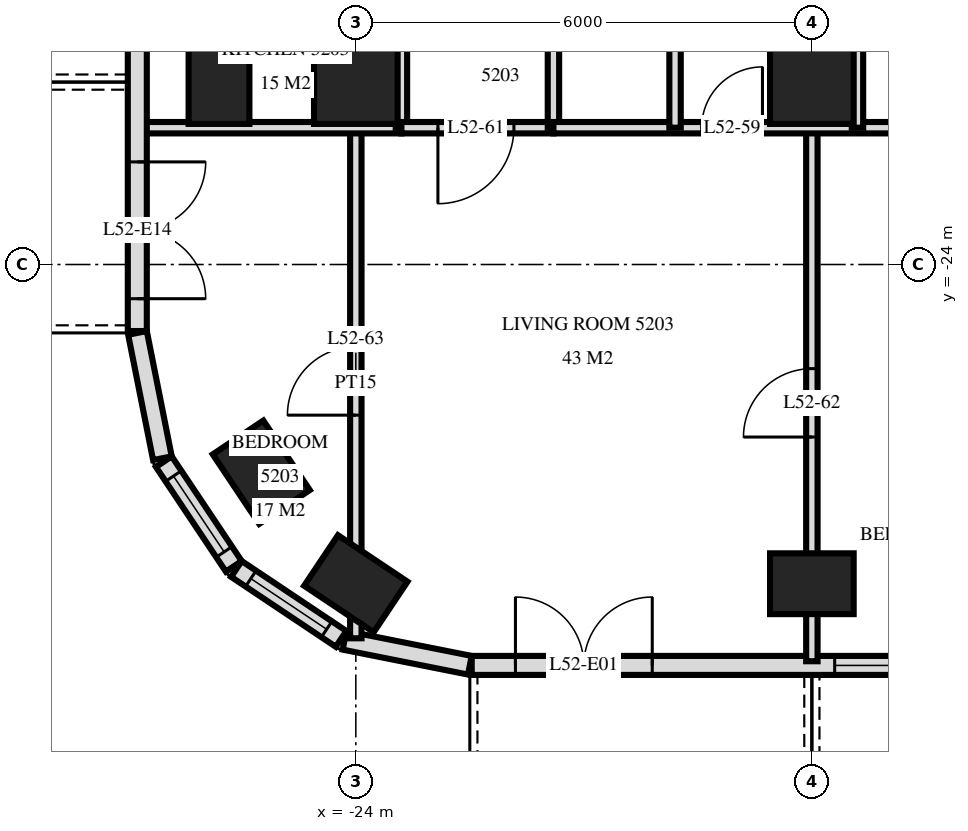
"""IFC4 building model, lengths in metres.
Left out: names, types, materials, properties, quantities, classifications, styles, units other than length and angle.
Written with IfcOpenShell. Run it as: python <this file> out.ifc"""

import sys

from ifc_helpers import new_model, si_unit, direction, frame, frame_2d, origin, origin_2d, place, context, subcontext, project, spatial, rectangle, extrude, element, fill, save


model = new_model("IFC4")
c1 = context("Model", 3, precision=1e-05, world=origin(), true_north=direction((0.0, 1.0)))
c2 = subcontext(c1, "Body", "Model", "MODEL_VIEW")
j1 = project(units=[si_unit("LENGTHUNIT", "METRE"), si_unit("PLANEANGLEUNIT", "RADIAN")], contexts=[c1])
p1 = place(None, origin())
s1 = spatial("IfcSite", under=j1, at=p1, CompositionType="ELEMENT")
p2 = place(p1, origin())
s2 = spatial("IfcBuilding", under=s1, at=p2, CompositionType="ELEMENT")
p3 = place(p2, frame((0.0, 0.0, 201.1)))
s3 = spatial("IfcBuildingStorey", under=s2, at=p3, CompositionType="ELEMENT", Elevation=201.1)
for number, where, z_axis, x_axis in (
    (1, (-25.8, -21.6, 0.0), (0.0, 0.0, 1.0), (0.0, 1.0, 0.0)),
    (2, (-25.244, -26.733, 0.0), (0.0, 0.0, 1.0), (-0.556, 0.831, 0.0)),
    (3, (-24.0, -28.2, 0.0), (0.0, 0.0, 1.0), (-0.831, 0.556, 0.0)),
):
    element("IfcColumn", number, at=place(p3, frame(where, z_axis=z_axis, x_axis=x_axis)), inside=s3, PredefinedType="COLUMN", context=c2, shape_type="SweptSolid", body=[
        extrude(rectangle(XDim=1.1, YDim=0.8, at=origin_2d()), origin(), (0.0, 0.0, 1.0), 3.5),
    ])
p4 = place(p3, frame((-24.0, -21.6, 0.0), z_axis=(0.0, 0.0, 1.0), x_axis=(1.0, 0.0, 0.0)))
e4 = element("IfcColumn", 4, at=p4, inside=s3, PredefinedType="COLUMN", context=c2, shape_type="SweptSolid", body=[
    extrude(rectangle(XDim=1.1, YDim=1.1, at=origin_2d()), origin(), (0.0, 0.0, 1.0), 3.5),
])
p5 = place(p3, frame((-18.0, -28.2, 0.0), z_axis=(0.0, 0.0, 1.0), x_axis=(1.0, 0.0, 0.0)))
e5 = element("IfcColumn", 5, at=p5, inside=s3, PredefinedType="COLUMN", context=c2, shape_type="SweptSolid", body=[
    extrude(rectangle(XDim=1.1, YDim=0.8, at=origin_2d()), origin(), (0.0, 0.0, 1.0), 3.5),
])
p6 = place(p3, frame((-18.0, -21.6, 0.0), z_axis=(0.0, 0.0, 1.0), x_axis=(1.0, 0.0, 0.0)))
e6 = element("IfcColumn", 6, at=p6, inside=s3, PredefinedType="COLUMN", context=c2, shape_type="SweptSolid", body=[
    extrude(rectangle(XDim=1.1, YDim=1.1, at=origin_2d()), origin(), (0.0, 0.0, 1.0), 3.5),
])
p7 = place(p3, frame((-26.875, -3.325, 0.0), z_axis=(0.0, 0.0, 1.0), x_axis=(0.0, -1.0, 0.0)))
e7 = element("IfcWall", 7, at=p7, inside=s3, PredefinedType="SOLIDWALL", context=c2, shape_type="SweptSolid", body=[
    extrude(rectangle(XDim=21.551, YDim=0.25, at=frame_2d((10.775, 0.0))), origin(), (0.0, 0.0, 1.0), 3.22),
])
p8 = place(p7, frame((7.775, 0.0, 0.0)))
e8 = element("IfcOpeningElement", 8, at=p8, cuts=e7, PredefinedType="OPENING", context=c2, shape_type="SweptSolid", body=[
    extrude(rectangle(XDim=1.8, YDim=2.4, at=frame_2d((0.9, 1.2))), frame((0.0, 0.135, 0.0), z_axis=(0.0, -1.0, 0.0), x_axis=(1.0, 0.0, 0.0)), (0.0, 0.0, 1.0), 0.27),
])
p9 = place(p7, frame((12.575, 0.0, 0.9)))
e9 = element("IfcOpeningElement", 9, at=p9, cuts=e7, PredefinedType="OPENING", context=c2, shape_type="SweptSolid", body=[
    extrude(rectangle(XDim=1.2, YDim=1.5, at=frame_2d((0.6, 0.75))), frame((0.0, 0.135, 0.0), z_axis=(0.0, -1.0, 0.0), x_axis=(1.0, 0.0, 0.0)), (0.0, 0.0, 1.0), 0.27),
])
p10 = place(p7, frame((15.275, 0.0, 0.0)))
e10 = element("IfcOpeningElement", 10, at=p10, cuts=e7, PredefinedType="OPENING", context=c2, shape_type="SweptSolid", body=[
    extrude(rectangle(XDim=1.8, YDim=2.4, at=frame_2d((0.9, 1.2))), frame((0.0, 0.135, 0.0), z_axis=(0.0, -1.0, 0.0), x_axis=(1.0, 0.0, 0.0)), (0.0, 0.0, 1.0), 0.27),
])
p11 = place(p7, frame((19.325, 0.0, 0.0)))
e11 = element("IfcOpeningElement", 11, at=p11, cuts=e7, PredefinedType="OPENING", context=c2, shape_type="SweptSolid", body=[
    extrude(rectangle(XDim=1.8, YDim=2.4, at=frame_2d((0.9, 1.2))), frame((0.0, 0.135, 0.0), z_axis=(0.0, -1.0, 0.0), x_axis=(1.0, 0.0, 0.0)), (0.0, 0.0, 1.0), 0.27),
])
p12 = place(p3, frame((-26.873, -24.9, 0.0), z_axis=(0.0, 0.0, 1.0), x_axis=(0.195026884138, -0.980797896849, 0.0)))
e12 = element("IfcWall", 12, at=p12, inside=s3, PredefinedType="SOLIDWALL", context=c2, shape_type="SweptSolid", body=[
    extrude(rectangle(XDim=1.681, YDim=0.25, at=frame_2d((0.841, 0.0))), origin(), (0.0, 0.0, 1.0), 3.22),
])
p13 = place(p3, frame((-26.526, -26.594, 0.0), z_axis=(0.0, 0.0, 1.0), x_axis=(0.55555029066, -0.831482937015, 0.0)))
e13 = element("IfcWall", 13, at=p13, inside=s3, PredefinedType="SOLIDWALL", context=c2, shape_type="SweptSolid", body=[
    extrude(rectangle(XDim=1.656, YDim=0.25, at=frame_2d((0.828, 0.0))), origin(), (0.0, 0.0, 1.0), 3.22),
])
p14 = place(p13, frame((0.228, 0.0, 0.9)))
e14 = element("IfcOpeningElement", 14, at=p14, cuts=e13, PredefinedType="OPENING", context=c2, shape_type="SweptSolid", body=[
    extrude(rectangle(XDim=1.2, YDim=1.5, at=frame_2d((0.6, 0.75))), frame((0.0, 0.135, 0.0), z_axis=(0.0, -1.0, 0.0), x_axis=(1.0, 0.0, 0.0)), (0.0, 0.0, 1.0), 0.27),
])
p15 = place(p3, frame((-25.571, -28.006, 0.0), z_axis=(0.0, 0.0, 1.0), x_axis=(0.831482937015, -0.55555029066, 0.0)))
e15 = element("IfcWall", 15, at=p15, inside=s3, PredefinedType="SOLIDWALL", context=c2, shape_type="SweptSolid", body=[
    extrude(rectangle(XDim=1.656, YDim=0.25, at=frame_2d((0.828, 0.0))), origin(), (0.0, 0.0, 1.0), 3.22),
])
p16 = place(p15, frame((0.228, 0.0, 0.9)))
e16 = element("IfcOpeningElement", 16, at=p16, cuts=e15, PredefinedType="OPENING", context=c2, shape_type="SweptSolid", body=[
    extrude(rectangle(XDim=1.2, YDim=1.5, at=frame_2d((0.6, 0.75))), frame((0.0, 0.135, 0.0), z_axis=(0.0, -1.0, 0.0), x_axis=(1.0, 0.0, 0.0)), (0.0, 0.0, 1.0), 0.27),
])
p17 = place(p3, frame((-24.149, -28.945, 0.0), z_axis=(0.0, 0.0, 1.0), x_axis=(0.980775640221, -0.19513878023, 0.0)))
e17 = element("IfcWall", 17, at=p17, inside=s3, PredefinedType="SOLIDWALL", context=c2, shape_type="SweptSolid", body=[
    extrude(rectangle(XDim=1.681, YDim=0.25, at=frame_2d((0.841, 0.0))), origin(), (0.0, 0.0, 1.0), 3.22),
])
p18 = place(p3, frame((-22.475, -29.275, 0.0), z_axis=(0.0, 0.0, 1.0), x_axis=(1.0, 0.0, 0.0)))
e18 = element("IfcWall", 18, at=p18, inside=s3, PredefinedType="SOLIDWALL", context=c2, shape_type="SweptSolid", body=[
    extrude(rectangle(XDim=44.951, YDim=0.25, at=frame_2d((22.475, 0.0))), origin(), (0.0, 0.0, 1.0), 3.22),
])
p19 = place(p18, frame((0.575, 0.0, 0.0)))
e19 = element("IfcOpeningElement", 19, at=p19, cuts=e18, PredefinedType="OPENING", context=c2, shape_type="SweptSolid", body=[
    extrude(rectangle(XDim=1.8, YDim=2.4, at=frame_2d((0.9, 1.2))), frame((0.0, 0.135, 0.0), z_axis=(0.0, -1.0, 0.0), x_axis=(1.0, 0.0, 0.0)), (0.0, 0.0, 1.0), 0.27),
])
p20 = place(p18, frame((4.775, 0.0, 0.9)))
e20 = element("IfcOpeningElement", 20, at=p20, cuts=e18, PredefinedType="OPENING", context=c2, shape_type="SweptSolid", body=[
    extrude(rectangle(XDim=2.4, YDim=1.5, at=frame_2d((1.2, 0.75))), frame((0.0, 0.135, 0.0), z_axis=(0.0, -1.0, 0.0), x_axis=(1.0, 0.0, 0.0)), (0.0, 0.0, 1.0), 0.27),
])
p21 = place(p18, frame((8.075, 0.0, 0.0)))
e21 = element("IfcOpeningElement", 21, at=p21, cuts=e18, PredefinedType="OPENING", context=c2, shape_type="SweptSolid", body=[
    extrude(rectangle(XDim=1.8, YDim=2.4, at=frame_2d((0.9, 1.2))), frame((0.0, 0.135, 0.0), z_axis=(0.0, -1.0, 0.0), x_axis=(1.0, 0.0, 0.0)), (0.0, 0.0, 1.0), 0.27),
])
p22 = place(p18, frame((11.075, 0.0, 0.0)))
e22 = element("IfcOpeningElement", 22, at=p22, cuts=e18, PredefinedType="OPENING", context=c2, shape_type="SweptSolid", body=[
    extrude(rectangle(XDim=1.8, YDim=2.4, at=frame_2d((0.9, 1.2))), frame((0.0, 0.135, 0.0), z_axis=(0.0, -1.0, 0.0), x_axis=(1.0, 0.0, 0.0)), (0.0, 0.0, 1.0), 0.27),
])
p23 = place(p18, frame((13.775, 0.0, 0.9)))
e23 = element("IfcOpeningElement", 23, at=p23, cuts=e18, PredefinedType="OPENING", context=c2, shape_type="SweptSolid", body=[
    extrude(rectangle(XDim=2.4, YDim=1.5, at=frame_2d((1.2, 0.75))), frame((0.0, 0.135, 0.0), z_axis=(0.0, -1.0, 0.0), x_axis=(1.0, 0.0, 0.0)), (0.0, 0.0, 1.0), 0.27),
])
p24 = place(p18, frame((16.775, 0.0, 0.9)))
e24 = element("IfcOpeningElement", 24, at=p24, cuts=e18, PredefinedType="OPENING", context=c2, shape_type="SweptSolid", body=[
    extrude(rectangle(XDim=2.4, YDim=1.5, at=frame_2d((1.2, 0.75))), frame((0.0, 0.135, 0.0), z_axis=(0.0, -1.0, 0.0), x_axis=(1.0, 0.0, 0.0)), (0.0, 0.0, 1.0), 0.27),
])
p25 = place(p18, frame((20.075, 0.0, 0.0)))
e25 = element("IfcOpeningElement", 25, at=p25, cuts=e18, PredefinedType="OPENING", context=c2, shape_type="SweptSolid", body=[
    extrude(rectangle(XDim=1.8, YDim=2.4, at=frame_2d((0.9, 1.2))), frame((0.0, 0.135, 0.0), z_axis=(0.0, -1.0, 0.0), x_axis=(1.0, 0.0, 0.0)), (0.0, 0.0, 1.0), 0.27),
])
p26 = place(p18, frame((23.075, 0.0, 0.0)))
e26 = element("IfcOpeningElement", 26, at=p26, cuts=e18, PredefinedType="OPENING", context=c2, shape_type="SweptSolid", body=[
    extrude(rectangle(XDim=1.8, YDim=2.4, at=frame_2d((0.9, 1.2))), frame((0.0, 0.135, 0.0), z_axis=(0.0, -1.0, 0.0), x_axis=(1.0, 0.0, 0.0)), (0.0, 0.0, 1.0), 0.27),
])
p27 = place(p18, frame((25.775, 0.0, 0.9)))
e27 = element("IfcOpeningElement", 27, at=p27, cuts=e18, PredefinedType="OPENING", context=c2, shape_type="SweptSolid", body=[
    extrude(rectangle(XDim=2.4, YDim=1.5, at=frame_2d((1.2, 0.75))), frame((0.0, 0.135, 0.0), z_axis=(0.0, -1.0, 0.0), x_axis=(1.0, 0.0, 0.0)), (0.0, 0.0, 1.0), 0.27),
])
p28 = place(p18, frame((29.075, 0.0, 0.0)))
e28 = element("IfcOpeningElement", 28, at=p28, cuts=e18, PredefinedType="OPENING", context=c2, shape_type="SweptSolid", body=[
    extrude(rectangle(XDim=1.8, YDim=2.4, at=frame_2d((0.9, 1.2))), frame((0.0, 0.135, 0.0), z_axis=(0.0, -1.0, 0.0), x_axis=(1.0, 0.0, 0.0)), (0.0, 0.0, 1.0), 0.27),
])
p29 = place(p18, frame((31.775, 0.0, 0.9)))
e29 = element("IfcOpeningElement", 29, at=p29, cuts=e18, PredefinedType="OPENING", context=c2, shape_type="SweptSolid", body=[
    extrude(rectangle(XDim=2.4, YDim=1.5, at=frame_2d((1.2, 0.75))), frame((0.0, 0.135, 0.0), z_axis=(0.0, -1.0, 0.0), x_axis=(1.0, 0.0, 0.0)), (0.0, 0.0, 1.0), 0.27),
])
p30 = place(p18, frame((35.075, 0.0, 0.0)))
e30 = element("IfcOpeningElement", 30, at=p30, cuts=e18, PredefinedType="OPENING", context=c2, shape_type="SweptSolid", body=[
    extrude(rectangle(XDim=1.8, YDim=2.4, at=frame_2d((0.9, 1.2))), frame((0.0, 0.135, 0.0), z_axis=(0.0, -1.0, 0.0), x_axis=(1.0, 0.0, 0.0)), (0.0, 0.0, 1.0), 0.27),
])
p31 = place(p18, frame((37.775, 0.0, 0.9)))
e31 = element("IfcOpeningElement", 31, at=p31, cuts=e18, PredefinedType="OPENING", context=c2, shape_type="SweptSolid", body=[
    extrude(rectangle(XDim=2.4, YDim=1.5, at=frame_2d((1.2, 0.75))), frame((0.0, 0.135, 0.0), z_axis=(0.0, -1.0, 0.0), x_axis=(1.0, 0.0, 0.0)), (0.0, 0.0, 1.0), 0.27),
])
p32 = place(p18, frame((41.075, 0.0, 0.0)))
e32 = element("IfcOpeningElement", 32, at=p32, cuts=e18, PredefinedType="OPENING", context=c2, shape_type="SweptSolid", body=[
    extrude(rectangle(XDim=1.8, YDim=2.4, at=frame_2d((0.9, 1.2))), frame((0.0, 0.135, 0.0), z_axis=(0.0, -1.0, 0.0), x_axis=(1.0, 0.0, 0.0)), (0.0, 0.0, 1.0), 0.27),
])
p33 = place(p3, frame((-17.4, -22.2, 0.0), z_axis=(0.0, 0.0, 1.0), x_axis=(0.0, 1.0, 0.0)))
e33 = element("IfcWall", 33, at=p33, inside=s3, PredefinedType="PARTITIONING", context=c2, shape_type="SweptSolid", body=[
    extrude(rectangle(XDim=4.2, YDim=0.15, at=frame_2d((2.1, 0.0))), origin(), (0.0, 0.0, 1.0), 3.22),
])
p34 = place(p3, frame((-18.0, -29.22, 0.0), z_axis=(0.0, 0.0, 1.0), x_axis=(0.0, 1.0, 0.0)))
e34 = element("IfcWall", 34, at=p34, inside=s3, PredefinedType="PARTITIONING", context=c2, shape_type="SweptSolid", body=[
    extrude(rectangle(XDim=7.02, YDim=0.15, at=frame_2d((3.51, 0.0))), origin(), (0.0, 0.0, 1.0), 3.22),
])
p35 = place(p34, frame((2.95, 0.0, 0.0)))
e35 = element("IfcOpeningElement", 35, at=p35, cuts=e34, PredefinedType="OPENING", context=c2, shape_type="SweptSolid", body=[
    extrude(rectangle(XDim=0.9, YDim=2.1, at=frame_2d((0.45, 1.05))), frame((0.0, 0.085, 0.0), z_axis=(0.0, -1.0, 0.0), x_axis=(1.0, 0.0, 0.0)), (0.0, 0.0, 1.0), 0.17),
])
for number, where, z_axis, x_axis in (
    (36, (-19.8, -22.2, 0.0), (0.0, 0.0, 1.0), (0.0, 1.0, 0.0)),
    (37, (-21.4, -22.2, 0.0), (0.0, 0.0, 1.0), (0.0, 1.0, 0.0)),
):
    element("IfcWall", number, at=place(p3, frame(where, z_axis=z_axis, x_axis=x_axis)), inside=s3, PredefinedType="PARTITIONING", context=c2, shape_type="SweptSolid", body=[
        extrude(rectangle(XDim=4.2, YDim=0.15, at=frame_2d((2.1, 0.0))), origin(), (0.0, 0.0, 1.0), 3.22),
    ])
p36 = place(p3, frame((-23.4, -22.2, 0.0), z_axis=(0.0, 0.0, 1.0), x_axis=(0.0, 1.0, 0.0)))
e38 = element("IfcWall", 38, at=p36, inside=s3, PredefinedType="PARTITIONING", context=c2, shape_type="SweptSolid", body=[
    extrude(rectangle(XDim=4.2, YDim=0.15, at=frame_2d((2.1, 0.0))), origin(), (0.0, 0.0, 1.0), 3.22),
])
p37 = place(p36, frame((1.58, 0.0, 0.0)))
e39 = element("IfcOpeningElement", 39, at=p37, cuts=e38, PredefinedType="OPENING", context=c2, shape_type="SweptSolid", body=[
    extrude(rectangle(XDim=1.0, YDim=2.1, at=frame_2d((0.5, 1.05))), frame((0.0, 0.085, 0.0), z_axis=(0.0, -1.0, 0.0), x_axis=(1.0, 0.0, 0.0)), (0.0, 0.0, 1.0), 0.17),
])
p38 = place(p3, frame((-24.0, -28.918, 0.0), z_axis=(0.0, 0.0, 1.0), x_axis=(0.0, 1.0, 0.0)))
e40 = element("IfcWall", 40, at=p38, inside=s3, PredefinedType="PARTITIONING", context=c2, shape_type="SweptSolid", body=[
    extrude(rectangle(XDim=6.718, YDim=0.15, at=frame_2d((3.359, 0.0))), origin(), (0.0, 0.0, 1.0), 3.22),
])
p39 = place(p38, frame((2.936, 0.0, 0.0)))
e41 = element("IfcOpeningElement", 41, at=p39, cuts=e40, PredefinedType="OPENING", context=c2, shape_type="SweptSolid", body=[
    extrude(rectangle(XDim=0.9, YDim=2.1, at=frame_2d((0.45, 1.05))), frame((0.0, 0.085, 0.0), z_axis=(0.0, -1.0, 0.0), x_axis=(1.0, 0.0, 0.0)), (0.0, 0.0, 1.0), 0.17),
])
p40 = place(p3, frame((-23.4, -22.2, 0.0), z_axis=(0.0, 0.0, 1.0), x_axis=(1.0, 0.0, 0.0)))
e42 = element("IfcWall", 42, at=p40, inside=s3, PredefinedType="PARTITIONING", context=c2, shape_type="SweptSolid", body=[
    extrude(rectangle(XDim=2.0, YDim=0.15, at=frame_2d((1.0, 0.0))), origin(), (0.0, 0.0, 1.0), 3.22),
])
p41 = place(p40, frame((0.48, 0.0, 0.0)))
e43 = element("IfcOpeningElement", 43, at=p41, cuts=e42, PredefinedType="OPENING", context=c2, shape_type="SweptSolid", body=[
    extrude(rectangle(XDim=1.0, YDim=2.1, at=frame_2d((0.5, 1.05))), frame((0.0, 0.085, 0.0), z_axis=(0.0, -1.0, 0.0), x_axis=(1.0, 0.0, 0.0)), (0.0, 0.0, 1.0), 0.17),
])
p42 = place(p3, frame((-26.82, -22.2, 0.0), z_axis=(0.0, 0.0, 1.0), x_axis=(1.0, 0.0, 0.0)))
e44 = element("IfcWall", 44, at=p42, inside=s3, PredefinedType="PARTITIONING", context=c2, shape_type="SweptSolid", body=[
    extrude(rectangle(XDim=3.42, YDim=0.15, at=frame_2d((1.71, 0.0))), origin(), (0.0, 0.0, 1.0), 3.22),
])
p43 = place(p3, frame((-21.4, -22.2, 0.0), z_axis=(0.0, 0.0, 1.0), x_axis=(1.0, 0.0, 0.0)))
e45 = element("IfcWall", 45, at=p43, inside=s3, PredefinedType="PARTITIONING", context=c2, shape_type="SweptSolid", body=[
    extrude(rectangle(XDim=6.4, YDim=0.15, at=frame_2d((3.2, 0.0))), origin(), (0.0, 0.0, 1.0), 3.22),
])
p44 = place(p43, frame((4.78, 0.0, 0.0)))
e46 = element("IfcOpeningElement", 46, at=p44, cuts=e45, PredefinedType="OPENING", context=c2, shape_type="SweptSolid", body=[
    extrude(rectangle(XDim=0.8, YDim=2.1, at=frame_2d((0.4, 1.05))), frame((0.0, 0.085, 0.0), z_axis=(0.0, -1.0, 0.0), x_axis=(1.0, 0.0, 0.0)), (0.0, 0.0, 1.0), 0.17),
])
p45 = place(p43, frame((1.95, 0.0, 0.0)))
e47 = element("IfcOpeningElement", 47, at=p45, cuts=e45, PredefinedType="OPENING", context=c2, shape_type="SweptSolid", body=[
    extrude(rectangle(XDim=0.8, YDim=2.1, at=frame_2d((0.4, 1.05))), frame((0.0, 0.085, 0.0), z_axis=(0.0, -1.0, 0.0), x_axis=(1.0, 0.0, 0.0)), (0.0, 0.0, 1.0), 0.17),
])
p46 = place(p14, origin())
e48 = element("IfcWindow", 48, at=p46, inside=s3, PartitioningType="SINGLE_PANEL", PredefinedType="WINDOW", context=c2, shape_type="SweptSolid", body=[
    extrude(rectangle(XDim=1.2, YDim=1.5, at=frame_2d((0.6, 0.75))), frame((0.0, 0.03, 0.0), z_axis=(0.0, -1.0, 0.0), x_axis=(1.0, 0.0, 0.0)), (0.0, 0.0, 1.0), 0.06),
])
fill(e14, e48)
p47 = place(p16, origin())
e49 = element("IfcWindow", 49, at=p47, inside=s3, PartitioningType="SINGLE_PANEL", PredefinedType="WINDOW", context=c2, shape_type="SweptSolid", body=[
    extrude(rectangle(XDim=1.2, YDim=1.5, at=frame_2d((0.6, 0.75))), frame((0.0, 0.03, 0.0), z_axis=(0.0, -1.0, 0.0), x_axis=(1.0, 0.0, 0.0)), (0.0, 0.0, 1.0), 0.06),
])
fill(e16, e49)
p48 = place(p19, origin())
e50 = element("IfcDoor", 50, at=p48, inside=s3, OperationType="DOUBLE_DOOR_SINGLE_SWING", PredefinedType="DOOR", context=c2, shape_type="SweptSolid", body=[
    extrude(rectangle(XDim=1.8, YDim=2.4, at=frame_2d((0.9, 1.2))), frame((0.0, 0.025, 0.0), z_axis=(0.0, -1.0, 0.0), x_axis=(1.0, 0.0, 0.0)), (0.0, 0.0, 1.0), 0.05),
])
fill(e19, e50)
p49 = place(p20, origin())
e51 = element("IfcWindow", 51, at=p49, inside=s3, PartitioningType="SINGLE_PANEL", PredefinedType="WINDOW", context=c2, shape_type="SweptSolid", body=[
    extrude(rectangle(XDim=2.4, YDim=1.5, at=frame_2d((1.2, 0.75))), frame((0.0, 0.03, 0.0), z_axis=(0.0, -1.0, 0.0), x_axis=(1.0, 0.0, 0.0)), (0.0, 0.0, 1.0), 0.06),
])
fill(e20, e51)
p50 = place(p11, origin())
e52 = element("IfcDoor", 52, at=p50, inside=s3, OperationType="DOUBLE_DOOR_SINGLE_SWING", PredefinedType="DOOR", context=c2, shape_type="SweptSolid", body=[
    extrude(rectangle(XDim=1.8, YDim=2.4, at=frame_2d((0.9, 1.2))), frame((0.0, 0.025, 0.0), z_axis=(0.0, -1.0, 0.0), x_axis=(1.0, 0.0, 0.0)), (0.0, 0.0, 1.0), 0.05),
])
fill(e11, e52)
p51 = place(p45, origin())
e53 = element("IfcDoor", 53, at=p51, inside=s3, OperationType="SINGLE_SWING_LEFT", PredefinedType="DOOR", context=c2, shape_type="SweptSolid", body=[
    extrude(rectangle(XDim=0.8, YDim=2.1, at=frame_2d((0.4, 1.05))), frame((0.0, 0.025, 0.0), z_axis=(0.0, -1.0, 0.0), x_axis=(1.0, 0.0, 0.0)), (0.0, 0.0, 1.0), 0.05),
])
fill(e47, e53)
p52 = place(p41, frame((0.5, 0.0, 0.0), z_axis=(0.0, 0.0, 1.0), x_axis=(-1.0, 0.0, 0.0)))
e54 = element("IfcDoor", 54, at=p52, inside=s3, OperationType="SINGLE_SWING_LEFT", PredefinedType="DOOR", context=c2, shape_type="SweptSolid", body=[
    extrude(rectangle(XDim=1.0, YDim=2.1, at=frame_2d((0.0, 1.05))), frame((0.0, -0.025, 0.0), z_axis=(0.0, 1.0, 0.0), x_axis=(-1.0, 0.0, 0.0)), (0.0, 0.0, 1.0), 0.05),
])
fill(e43, e54)
p53 = place(p35, origin())
e55 = element("IfcDoor", 55, at=p53, inside=s3, OperationType="SINGLE_SWING_RIGHT", PredefinedType="DOOR", context=c2, shape_type="SweptSolid", body=[
    extrude(rectangle(XDim=0.9, YDim=2.1, at=frame_2d((0.45, 1.05))), frame((0.0, 0.025, 0.0), z_axis=(0.0, -1.0, 0.0), x_axis=(1.0, 0.0, 0.0)), (0.0, 0.0, 1.0), 0.05),
])
fill(e35, e55)
p54 = place(p39, origin())
e56 = element("IfcDoor", 56, at=p54, inside=s3, OperationType="SINGLE_SWING_RIGHT", PredefinedType="DOOR", context=c2, shape_type="SweptSolid", body=[
    extrude(rectangle(XDim=0.9, YDim=2.1, at=frame_2d((0.45, 1.05))), frame((0.0, 0.025, 0.0), z_axis=(0.0, -1.0, 0.0), x_axis=(1.0, 0.0, 0.0)), (0.0, 0.0, 1.0), 0.05),
])
fill(e41, e56)
save(model, sys.argv[1])
